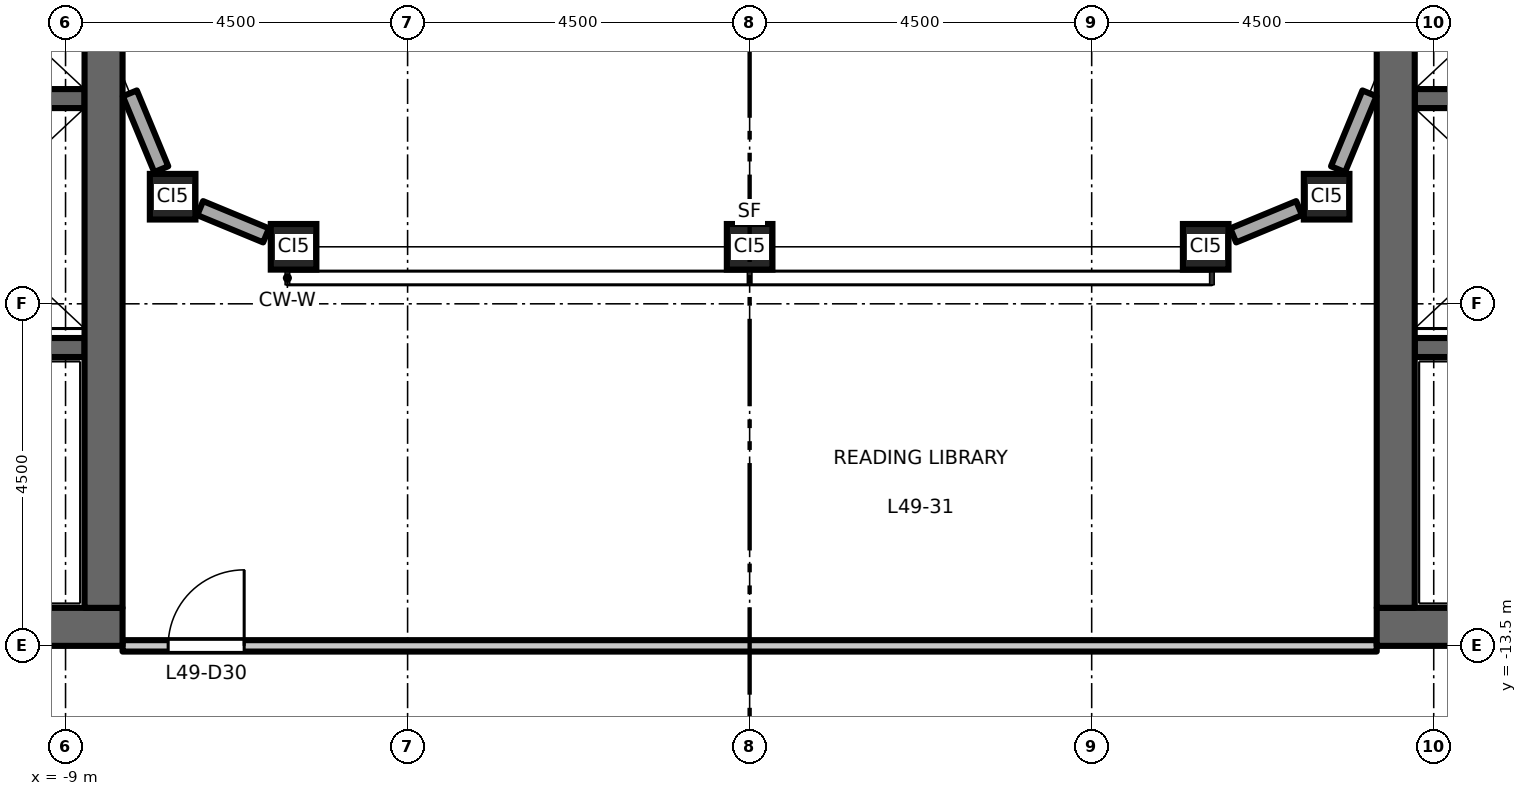
"""IFC4 building model, lengths in metres.
Left out: names, types, materials, properties, quantities, classifications, styles, units other than length and angle.
Written with IfcOpenShell. Run it as: python <this file> out.ifc"""

import sys

from ifc_helpers import new_model, si_unit, direction, frame, frame_2d, origin, origin_2d, place, context, subcontext, project, spatial, rectangle, hollow_rectangle, extrude, element, fill, save


model = new_model("IFC4")
c1 = context("Model", 3, precision=1e-05, world=origin(), true_north=direction((0.0, 1.0)))
c2 = subcontext(c1, "Body", "Model", "MODEL_VIEW")
j1 = project(units=[si_unit("LENGTHUNIT", "METRE"), si_unit("PLANEANGLEUNIT", "RADIAN")], contexts=[c1])
p1 = place(None, origin())
s1 = spatial("IfcSite", under=j1, at=p1, CompositionType="ELEMENT")
p2 = place(p1, origin())
s2 = spatial("IfcBuilding", under=s1, at=p2, CompositionType="ELEMENT")
p3 = place(p2, frame((0.0, 0.0, 228.7)))
s3 = spatial("IfcBuildingStorey", under=s2, at=p3, CompositionType="ELEMENT", Elevation=228.7)
for number, where, z_axis, x_axis in (
    (1, (-7.591, -7.591, 0.0), (0.0, 0.0, 1.0), (1.0, 0.0, 0.0)),
    (2, (-6.0, -8.25, 0.0), (0.0, 0.0, 1.0), (1.0, 0.0, 0.0)),
    (3, (0.0, -8.25, 0.0), (0.0, 0.0, 1.0), (1.0, 0.0, 0.0)),
    (4, (6.0, -8.25, 0.0), (0.0, 0.0, 1.0), (1.0, 0.0, 0.0)),
    (5, (7.591, -7.591, 0.0), (0.0, 0.0, 1.0), (1.0, 0.0, 0.0)),
):
    element("IfcColumn", number, at=place(p3, frame(where, z_axis=z_axis, x_axis=x_axis)), inside=s3, PredefinedType="COLUMN", context=c2, shape_type="SweptSolid", body=[
        extrude(hollow_rectangle(XDim=0.6, YDim=0.6, WallThickness=0.032, at=origin_2d()), origin(), (0.0, 0.0, 1.0), 4.5),
    ])
p4 = place(p3, frame((-8.75, -6.3, 0.0), z_axis=(0.0, 0.0, 1.0), x_axis=(-1.0, 0.0, 0.0)))
e6 = element("IfcWall", 6, at=p4, inside=s3, PredefinedType="SHEAR", context=c2, shape_type="SweptSolid", body=[
    extrude(rectangle(XDim=3.1, YDim=0.25, at=frame_2d((1.55, 0.0))), origin(), (0.0, 0.0, 1.0), 4.35),
])
p5 = place(p3, frame((-8.75, -9.575, 0.0), z_axis=(0.0, 0.0, 1.0), x_axis=(-1.0, 0.0, 0.0)))
e7 = element("IfcWall", 7, at=p5, inside=s3, PredefinedType="SHEAR", context=c2, shape_type="SweptSolid", body=[
    extrude(rectangle(XDim=8.0, YDim=0.25, at=frame_2d((4.0, 0.0))), origin(), (0.0, 0.0, 1.0), 4.35),
])
p6 = place(p5, frame((6.65, 0.0, 0.0)))
e8 = element("IfcOpeningElement", 8, at=p6, cuts=e7, PredefinedType="OPENING", context=c2, shape_type="SweptSolid", body=[
    extrude(rectangle(XDim=1.1, YDim=2.1, at=frame_2d((0.55, 1.05))), frame((0.0, 0.135, 0.0), z_axis=(0.0, -1.0, 0.0), x_axis=(1.0, 0.0, 0.0)), (0.0, 0.0, 1.0), 0.27),
])
p7 = place(p3, frame((-8.25, -13.25, 0.0), z_axis=(0.0, 0.0, 1.0), x_axis=(-1.0, 0.0, 0.0)))
e9 = element("IfcWall", 9, at=p7, inside=s3, PredefinedType="SHEAR", context=c2, shape_type="SweptSolid", body=[
    extrude(rectangle(XDim=13.5, YDim=0.5, at=frame_2d((6.75, 0.0))), origin(), (0.0, 0.0, 1.0), 4.35),
])
p8 = place(p3, frame((-8.5, -13.0, 0.0), z_axis=(0.0, 0.0, 1.0), x_axis=(0.0, 1.0, 0.0)))
e10 = element("IfcWall", 10, at=p8, inside=s3, PredefinedType="SHEAR", context=c2, shape_type="SweptSolid", body=[
    extrude(rectangle(XDim=26.0, YDim=0.5, at=frame_2d((13.0, 0.0))), origin(), (0.0, 0.0, 1.0), 4.35),
])
p9 = place(p3, frame((8.75, -6.3, 0.0), z_axis=(0.0, 0.0, 1.0), x_axis=(1.0, 0.0, 0.0)))
e11 = element("IfcWall", 11, at=p9, inside=s3, PredefinedType="SHEAR", context=c2, shape_type="SweptSolid", body=[
    extrude(rectangle(XDim=3.1, YDim=0.25, at=frame_2d((1.55, 0.0))), origin(), (0.0, 0.0, 1.0), 4.35),
])
p10 = place(p3, frame((8.75, -9.575, 0.0), z_axis=(0.0, 0.0, 1.0), x_axis=(1.0, 0.0, 0.0)))
e12 = element("IfcWall", 12, at=p10, inside=s3, PredefinedType="SHEAR", context=c2, shape_type="SweptSolid", body=[
    extrude(rectangle(XDim=8.0, YDim=0.25, at=frame_2d((4.0, 0.0))), origin(), (0.0, 0.0, 1.0), 4.35),
])
p11 = place(p10, frame((6.65, 0.0, 0.0)))
e13 = element("IfcOpeningElement", 13, at=p11, cuts=e12, PredefinedType="OPENING", context=c2, shape_type="SweptSolid", body=[
    extrude(rectangle(XDim=1.1, YDim=2.1, at=frame_2d((0.55, 1.05))), frame((0.0, 0.135, 0.0), z_axis=(0.0, -1.0, 0.0), x_axis=(1.0, 0.0, 0.0)), (0.0, 0.0, 1.0), 0.27),
])
p12 = place(p3, frame((8.25, -13.25, 0.0), z_axis=(0.0, 0.0, 1.0), x_axis=(1.0, 0.0, 0.0)))
e14 = element("IfcWall", 14, at=p12, inside=s3, PredefinedType="SHEAR", context=c2, shape_type="SweptSolid", body=[
    extrude(rectangle(XDim=13.5, YDim=0.5, at=frame_2d((6.75, 0.0))), origin(), (0.0, 0.0, 1.0), 4.35),
])
p13 = place(p3, frame((8.5, -13.0, 0.0), z_axis=(0.0, 0.0, 1.0), x_axis=(0.0, 1.0, 0.0)))
e15 = element("IfcWall", 15, at=p13, inside=s3, PredefinedType="SHEAR", context=c2, shape_type="SweptSolid", body=[
    extrude(rectangle(XDim=26.0, YDim=0.5, at=frame_2d((13.0, 0.0))), origin(), (0.0, 0.0, 1.0), 4.35),
])
p14 = place(p3, frame((6.362, -8.1, 0.0), z_axis=(0.0, 0.0, 1.0), x_axis=(0.923829670615, 0.382803787458, 0.0)))
e16 = element("IfcWall", 16, at=p14, inside=s3, PredefinedType="STANDARD", context=c2, shape_type="SweptSolid", body=[
    extrude(rectangle(XDim=0.938, YDim=0.2, at=frame_2d((0.469, 0.0))), origin(), (0.0, 0.0, 1.0), 3.918),
])
for number, where, z_axis, x_axis in (
    (17, (7.741, -7.229, 0.0), (0.0, 0.0, 1.0), (0.383, 0.924, 0.0)),
    (18, (-8.154, -6.231, 0.0), (0.0, 0.0, 1.0), (0.383, -0.924, 0.0)),
):
    element("IfcWall", number, at=place(p3, frame(where, z_axis=z_axis, x_axis=x_axis)), inside=s3, PredefinedType="STANDARD", context=c2, shape_type="SweptSolid", body=[
        extrude(rectangle(XDim=1.08, YDim=0.2, at=frame_2d((0.54, 0.0))), origin(), (0.0, 0.0, 1.0), 3.918),
    ])
p15 = place(p3, frame((-7.229, -7.741, 0.0), z_axis=(0.0, 0.0, 1.0), x_axis=(0.923829670615, -0.382803787458, 0.0)))
e19 = element("IfcWall", 19, at=p15, inside=s3, PredefinedType="STANDARD", context=c2, shape_type="SweptSolid", body=[
    extrude(rectangle(XDim=0.938, YDim=0.2, at=frame_2d((0.469, 0.0))), origin(), (0.0, 0.0, 1.0), 3.918),
])
p16 = place(p3, frame((-8.25, -13.5, 0.0), z_axis=(0.0, 0.0, 1.0), x_axis=(1.0, 0.0, 0.0)))
e20 = element("IfcWall", 20, at=p16, inside=s3, PredefinedType="PARTITIONING", context=c2, shape_type="SweptSolid", body=[
    extrude(rectangle(XDim=16.5, YDim=0.15, at=frame_2d((8.25, 0.0))), origin(), (0.0, 0.0, 1.0), 3.95),
])
p17 = place(p16, frame((0.6, 0.0, 0.0)))
e21 = element("IfcOpeningElement", 21, at=p17, cuts=e20, PredefinedType="OPENING", context=c2, shape_type="SweptSolid", body=[
    extrude(rectangle(XDim=1.0, YDim=2.1, at=frame_2d((0.5, 1.05))), frame((0.0, 0.085, 0.0), z_axis=(0.0, -1.0, 0.0), x_axis=(1.0, 0.0, 0.0)), (0.0, 0.0, 1.0), 0.17),
])
p18 = place(p17, origin())
e22 = element("IfcDoor", 22, at=p18, inside=s3, OperationType="SINGLE_SWING_RIGHT", PredefinedType="DOOR", context=c2, shape_type="SweptSolid", body=[
    extrude(rectangle(XDim=1.0, YDim=2.1, at=frame_2d((0.5, 1.05))), frame((0.0, 0.025, 0.0), z_axis=(0.0, -1.0, 0.0), x_axis=(1.0, 0.0, 0.0)), (0.0, 0.0, 1.0), 0.05),
])
fill(e21, e22)
save(model, sys.argv[1])
